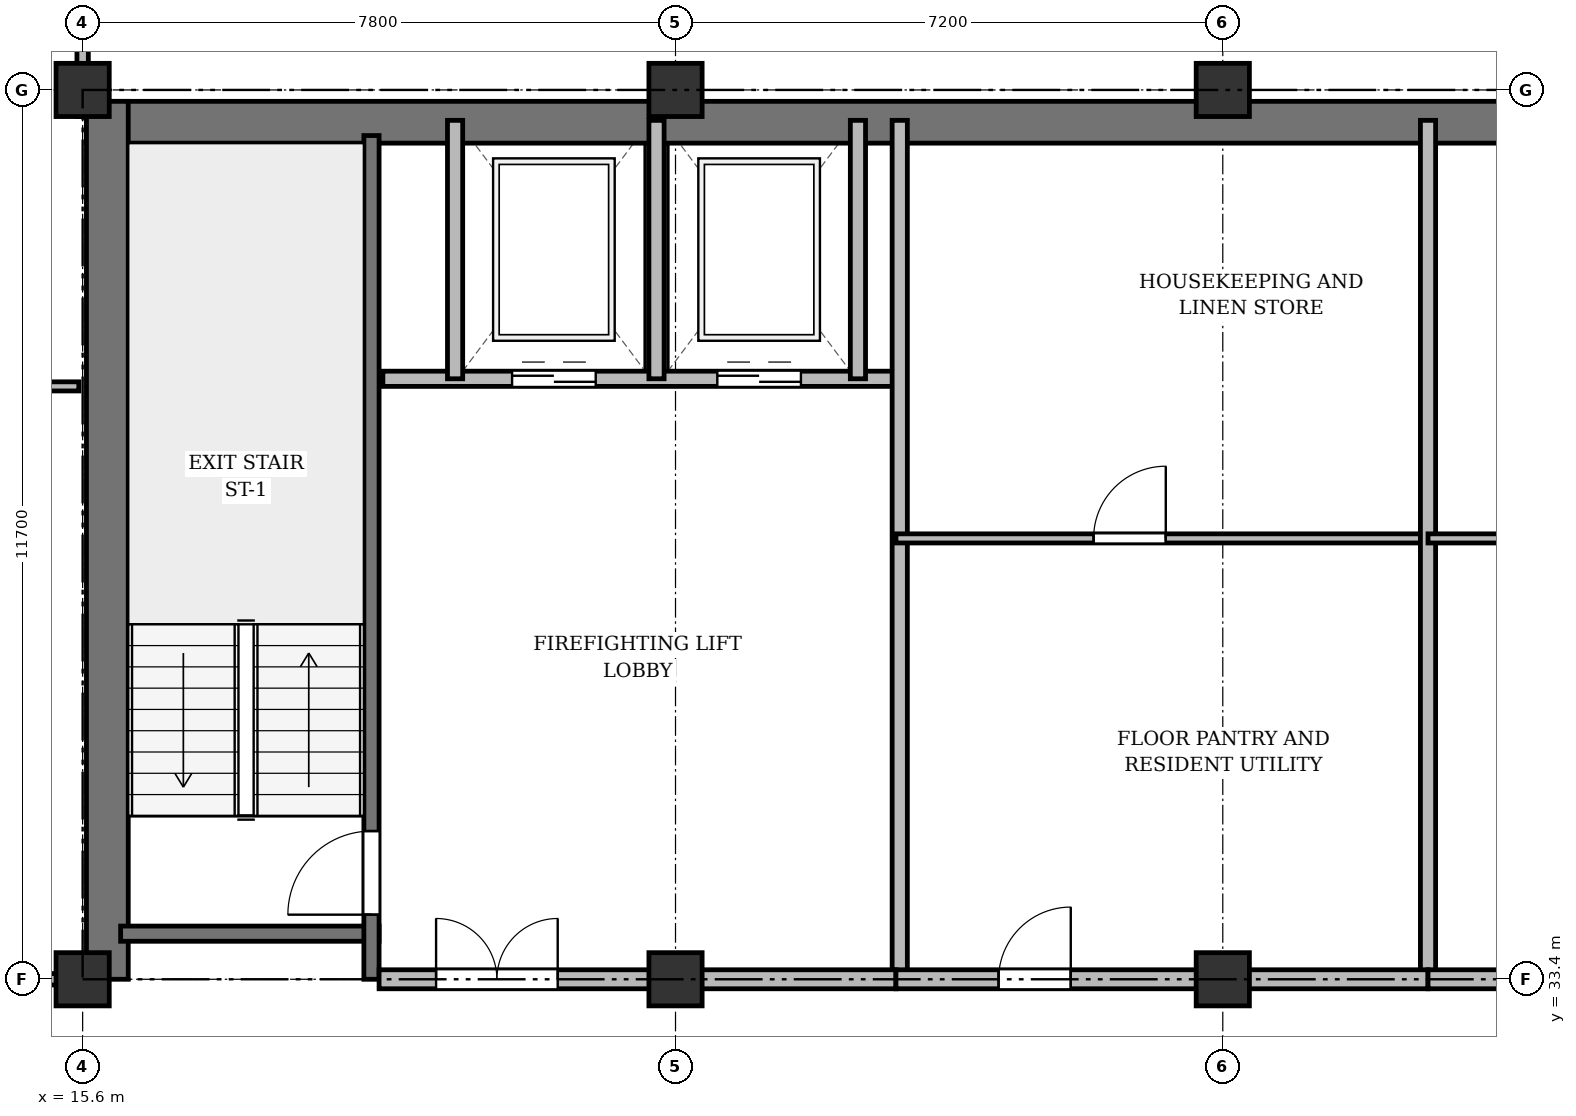
"""IFC4 building model, lengths in metres.
Left out: names, types, materials, properties, quantities, classifications, styles, units other than length and angle.
Written with IfcOpenShell. Run it as: python <this file> out.ifc"""

import sys

from ifc_helpers import new_model, si_unit, direction, frame, frame_2d, origin, origin_2d, place, context, subcontext, project, spatial, rectangle, extrude, source, transform, mapped, element, fill, save


model = new_model("IFC4")
c1 = context("Model", 3, precision=1e-05, world=origin(), true_north=direction((0.0, 1.0)))
c2 = subcontext(c1, "Body", "Model", "MODEL_VIEW")
j1 = project(units=[si_unit("LENGTHUNIT", "METRE"), si_unit("PLANEANGLEUNIT", "RADIAN")], contexts=[c1])
p1 = place(None, origin())
s1 = spatial("IfcSite", under=j1, at=p1, CompositionType="ELEMENT")
p2 = place(p1, origin())
s2 = spatial("IfcBuilding", under=s1, at=p2, CompositionType="ELEMENT")
p3 = place(p2, frame((0.0, 0.0, 233.7)))
s3 = spatial("IfcBuildingStorey", under=s2, at=p3, CompositionType="ELEMENT", Elevation=233.7)
m1 = source(origin(), c2, "Body", "SweptSolid", [
    extrude(rectangle(XDim=0.7, YDim=0.7, at=origin_2d()), origin(), (0.0, 0.0, 1.0), 3.6),
])
for number, where, z_axis, x_axis in (
    (1, (15.6, 33.4, 0.0), (0.0, 0.0, 1.0), (1.0, 0.0, 0.0)),
    (2, (15.6, 45.1, 0.0), (0.0, 0.0, 1.0), (1.0, 0.0, 0.0)),
    (3, (23.4, 33.4, 0.0), (0.0, 0.0, 1.0), (1.0, 0.0, 0.0)),
    (4, (23.4, 45.1, 0.0), (0.0, 0.0, 1.0), (1.0, 0.0, 0.0)),
    (5, (30.6, 33.4, 0.0), (0.0, 0.0, 1.0), (1.0, 0.0, 0.0)),
    (6, (30.6, 45.1, 0.0), (0.0, 0.0, 1.0), (1.0, 0.0, 0.0)),
):
    element("IfcColumn", number, at=place(p3, frame(where, z_axis=z_axis, x_axis=x_axis)), inside=s3, PredefinedType="COLUMN", context=c2, shape_type="MappedRepresentation", body=[
        mapped(m1, transform((0.0, 0.0, 0.0), x_axis=(1.0, 0.0, 0.0), y_axis=(0.0, 1.0, 0.0), z_axis=(0.0, 0.0, 1.0), scale=1.0)),
    ])
p4 = place(p3, frame((15.65, 44.675, 0.0), z_axis=(0.0, 0.0, 1.0), x_axis=(1.0, 0.0, 0.0)))
e7 = element("IfcWall", 7, at=p4, inside=s3, PredefinedType="SHEAR", context=c2, shape_type="SweptSolid", body=[
    extrude(rectangle(XDim=43.1, YDim=0.55, at=frame_2d((21.55, 0.0))), origin(), (0.0, 0.0, 1.0), 3.36),
])
p5 = place(p3, frame((15.925, 33.4, 0.0), z_axis=(0.0, 0.0, 1.0), x_axis=(0.0, 1.0, 0.0)))
e8 = element("IfcWall", 8, at=p5, inside=s3, PredefinedType="SHEAR", context=c2, shape_type="SweptSolid", body=[
    extrude(rectangle(XDim=11.55, YDim=0.55, at=frame_2d((5.775, 0.0))), origin(), (0.0, 0.0, 1.0), 3.36),
])
p6 = place(p3, frame((16.1, 34.0, 0.0), z_axis=(0.0, 0.0, 1.0), x_axis=(1.0, 0.0, 0.0)))
e9 = element("IfcWall", 9, at=p6, inside=s3, PredefinedType="SHEAR", context=c2, shape_type="SweptSolid", body=[
    extrude(rectangle(XDim=3.4, YDim=0.2, at=frame_2d((1.7, 0.0))), origin(), (0.0, 0.0, 1.0), 3.36),
])
p7 = place(p3, frame((19.4, 33.4, 0.0), z_axis=(0.0, 0.0, 1.0), x_axis=(0.0, 1.0, 0.0)))
e10 = element("IfcWall", 10, at=p7, inside=s3, PredefinedType="SHEAR", context=c2, shape_type="SweptSolid", body=[
    extrude(rectangle(XDim=11.1, YDim=0.2, at=frame_2d((5.55, 0.0))), origin(), (0.0, 0.0, 1.0), 3.36),
])
p8 = place(p7, frame((0.85, 0.0, 0.0)))
e11 = element("IfcOpeningElement", 11, at=p8, cuts=e10, PredefinedType="OPENING", context=c2, shape_type="SweptSolid", body=[
    extrude(rectangle(XDim=1.1, YDim=2.15, at=frame_2d((0.55, 1.075))), frame((0.0, 0.11, 0.0), z_axis=(0.0, -1.0, 0.0), x_axis=(1.0, 0.0, 0.0)), (0.0, 0.0, 1.0), 0.22),
])
p9 = place(p3, frame((19.55, 41.3, 0.0), z_axis=(0.0, 0.0, 1.0), x_axis=(1.0, 0.0, 0.0)))
e12 = element("IfcWall", 12, at=p9, inside=s3, PredefinedType="SOLIDWALL", context=c2, shape_type="SweptSolid", body=[
    extrude(rectangle(XDim=6.75, YDim=0.2, at=frame_2d((3.375, 0.0))), origin(), (0.0, 0.0, 1.0), 3.36),
])
p10 = place(p9, frame((1.7, 0.0, 0.0)))
e13 = element("IfcOpeningElement", 13, at=p10, cuts=e12, PredefinedType="OPENING", context=c2, shape_type="SweptSolid", body=[
    extrude(rectangle(XDim=1.1, YDim=2.15, at=frame_2d((0.55, 1.075))), frame((0.0, 0.11, 0.0), z_axis=(0.0, -1.0, 0.0), x_axis=(1.0, 0.0, 0.0)), (0.0, 0.0, 1.0), 0.22),
])
p11 = place(p9, frame((4.4, 0.0, 0.0)))
e14 = element("IfcOpeningElement", 14, at=p11, cuts=e12, PredefinedType="OPENING", context=c2, shape_type="SweptSolid", body=[
    extrude(rectangle(XDim=1.1, YDim=2.15, at=frame_2d((0.55, 1.075))), frame((0.0, 0.11, 0.0), z_axis=(0.0, -1.0, 0.0), x_axis=(1.0, 0.0, 0.0)), (0.0, 0.0, 1.0), 0.22),
])
for number, where, z_axis, x_axis in (
    (15, (20.5, 41.3, 0.0), (0.0, 0.0, 1.0), (0.0, 1.0, 0.0)),
    (16, (23.15, 41.3, 0.0), (0.0, 0.0, 1.0), (0.0, 1.0, 0.0)),
    (17, (25.8, 41.3, 0.0), (0.0, 0.0, 1.0), (0.0, 1.0, 0.0)),
):
    element("IfcWall", number, at=place(p3, frame(where, z_axis=z_axis, x_axis=x_axis)), inside=s3, PredefinedType="SOLIDWALL", context=c2, shape_type="SweptSolid", body=[
        extrude(rectangle(XDim=3.4, YDim=0.2, at=frame_2d((1.7, 0.0))), origin(), (0.0, 0.0, 1.0), 3.36),
    ])
p12 = place(p3, frame((26.35, 33.4, 0.0), z_axis=(0.0, 0.0, 1.0), x_axis=(0.0, 1.0, 0.0)))
e18 = element("IfcWall", 18, at=p12, inside=s3, PredefinedType="SOLIDWALL", context=c2, shape_type="SweptSolid", body=[
    extrude(rectangle(XDim=11.3, YDim=0.2, at=frame_2d((5.65, 0.0))), origin(), (0.0, 0.0, 1.0), 2.91),
])
p13 = place(p3, frame((19.5, 33.4, 0.0), z_axis=(0.0, 0.0, 1.0), x_axis=(1.0, 0.0, 0.0)))
e19 = element("IfcWall", 19, at=p13, inside=s3, PredefinedType="PARTITIONING", context=c2, shape_type="SweptSolid", body=[
    extrude(rectangle(XDim=6.8, YDim=0.25, at=frame_2d((3.4, 0.0))), origin(), (0.0, 0.0, 1.0), 2.91),
])
p14 = place(p13, frame((0.75, 0.0, 0.0)))
e20 = element("IfcOpeningElement", 20, at=p14, cuts=e19, PredefinedType="OPENING", context=c2, shape_type="SweptSolid", body=[
    extrude(rectangle(XDim=1.6, YDim=2.2, at=frame_2d((0.8, 1.1))), frame((0.0, 0.135, 0.0), z_axis=(0.0, -1.0, 0.0), x_axis=(1.0, 0.0, 0.0)), (0.0, 0.0, 1.0), 0.27),
])
p15 = place(p3, frame((26.3, 39.2, 0.0), z_axis=(0.0, 0.0, 1.0), x_axis=(1.0, 0.0, 0.0)))
e21 = element("IfcWall", 21, at=p15, inside=s3, PredefinedType="PARTITIONING", context=c2, shape_type="SweptSolid", body=[
    extrude(rectangle(XDim=7.0, YDim=0.12, at=frame_2d((3.5, 0.0))), origin(), (0.0, 0.0, 1.0), 2.86),
])
p16 = place(p15, frame((2.6, 0.0, 0.0)))
e22 = element("IfcOpeningElement", 22, at=p16, cuts=e21, PredefinedType="OPENING", context=c2, shape_type="SweptSolid", body=[
    extrude(rectangle(XDim=0.95, YDim=2.15, at=frame_2d((0.475, 1.075))), frame((0.0, 0.07, 0.0), z_axis=(0.0, -1.0, 0.0), x_axis=(1.0, 0.0, 0.0)), (0.0, 0.0, 1.0), 0.14),
])
p17 = place(p3, frame((33.3, 33.4, 0.0), z_axis=(0.0, 0.0, 1.0), x_axis=(0.0, 1.0, 0.0)))
e23 = element("IfcWall", 23, at=p17, inside=s3, PredefinedType="SOLIDWALL", context=c2, shape_type="SweptSolid", body=[
    extrude(rectangle(XDim=11.3, YDim=0.2, at=frame_2d((5.65, 0.0))), origin(), (0.0, 0.0, 1.0), 2.91),
])
p18 = place(p3, frame((33.3, 39.2, 0.0), z_axis=(0.0, 0.0, 1.0), x_axis=(1.0, 0.0, 0.0)))
e24 = element("IfcWall", 24, at=p18, inside=s3, PredefinedType="PARTITIONING", context=c2, shape_type="SweptSolid", body=[
    extrude(rectangle(XDim=6.8, YDim=0.12, at=frame_2d((3.4, 0.0))), origin(), (0.0, 0.0, 1.0), 3.36),
])
p19 = place(p18, frame((2.6, 0.0, 0.0)))
e25 = element("IfcOpeningElement", 25, at=p19, cuts=e24, PredefinedType="OPENING", context=c2, shape_type="SweptSolid", body=[
    extrude(rectangle(XDim=0.95, YDim=2.15, at=frame_2d((0.475, 1.075))), frame((0.0, 0.07, 0.0), z_axis=(0.0, -1.0, 0.0), x_axis=(1.0, 0.0, 0.0)), (0.0, 0.0, 1.0), 0.14),
])
p20 = place(p3, frame((26.3, 33.4, 0.0), z_axis=(0.0, 0.0, 1.0), x_axis=(1.0, 0.0, 0.0)))
e26 = element("IfcWall", 26, at=p20, inside=s3, PredefinedType="PARTITIONING", context=c2, shape_type="SweptSolid", body=[
    extrude(rectangle(XDim=7.0, YDim=0.25, at=frame_2d((3.5, 0.0))), origin(), (0.0, 0.0, 1.0), 2.91),
])
p21 = place(p20, frame((1.35, 0.0, 0.0)))
e27 = element("IfcOpeningElement", 27, at=p21, cuts=e26, PredefinedType="OPENING", context=c2, shape_type="SweptSolid", body=[
    extrude(rectangle(XDim=0.95, YDim=2.15, at=frame_2d((0.475, 1.075))), frame((0.0, 0.135, 0.0), z_axis=(0.0, -1.0, 0.0), x_axis=(1.0, 0.0, 0.0)), (0.0, 0.0, 1.0), 0.27),
])
p22 = place(p3, frame((33.3, 33.4, 0.0), z_axis=(0.0, 0.0, 1.0), x_axis=(1.0, 0.0, 0.0)))
e28 = element("IfcWall", 28, at=p22, inside=s3, PredefinedType="PARTITIONING", context=c2, shape_type="SweptSolid", body=[
    extrude(rectangle(XDim=6.8, YDim=0.25, at=frame_2d((3.4, 0.0))), origin(), (0.0, 0.0, 1.0), 2.91),
])
p23 = place(p22, frame((2.4, 0.0, 0.0)))
e29 = element("IfcOpeningElement", 29, at=p23, cuts=e28, PredefinedType="OPENING", context=c2, shape_type="SweptSolid", body=[
    extrude(rectangle(XDim=1.0, YDim=2.15, at=frame_2d((0.5, 1.075))), frame((0.0, 0.135, 0.0), z_axis=(0.0, -1.0, 0.0), x_axis=(1.0, 0.0, 0.0)), (0.0, 0.0, 1.0), 0.27),
])
p24 = place(p3, frame((8.3, 41.2, 0.0), z_axis=(0.0, 0.0, 1.0), x_axis=(1.0, 0.0, 0.0)))
e30 = element("IfcWall", 30, at=p24, inside=s3, PredefinedType="PARTITIONING", context=c2, shape_type="SweptSolid", body=[
    extrude(rectangle(XDim=7.25, YDim=0.12, at=frame_2d((3.625, 0.0))), origin(), (0.0, 0.0, 1.0), 2.86),
])
p25 = place(p24, frame((3.15, 0.0, 0.0)))
e31 = element("IfcOpeningElement", 31, at=p25, cuts=e30, PredefinedType="OPENING", context=c2, shape_type="SweptSolid", body=[
    extrude(rectangle(XDim=0.95, YDim=2.15, at=frame_2d((0.475, 1.075))), frame((0.0, 0.07, 0.0), z_axis=(0.0, -1.0, 0.0), x_axis=(1.0, 0.0, 0.0)), (0.0, 0.0, 1.0), 0.14),
])
p26 = place(p3, frame((8.25, 33.4, 0.0), z_axis=(0.0, 0.0, 1.0), x_axis=(1.0, 0.0, 0.0)))
e32 = element("IfcWall", 32, at=p26, inside=s3, PredefinedType="PARTITIONING", context=c2, shape_type="SweptSolid", body=[
    extrude(rectangle(XDim=7.35, YDim=0.15, at=frame_2d((3.675, 0.0))), origin(), (0.0, 0.0, 1.0), 2.91),
])
p27 = place(p26, frame((3.192, 0.0, 0.0)))
e33 = element("IfcOpeningElement", 33, at=p27, cuts=e32, PredefinedType="OPENING", context=c2, shape_type="SweptSolid", body=[
    extrude(rectangle(XDim=0.95, YDim=2.15, at=frame_2d((0.475, 1.075))), frame((0.0, 0.085, 0.0), z_axis=(0.0, -1.0, 0.0), x_axis=(1.0, 0.0, 0.0)), (0.0, 0.0, 1.0), 0.17),
])
p28 = place(p3, frame((15.6, 44.75, 0.0), z_axis=(0.0, 0.0, 1.0), x_axis=(0.0, 1.0, 0.0)))
e34 = element("IfcWall", 34, at=p28, inside=s3, PredefinedType="PARTITIONING", context=c2, shape_type="SweptSolid", body=[
    extrude(rectangle(XDim=3.61, YDim=0.15, at=frame_2d((1.805, 0.0))), origin(), (0.0, 0.0, 1.0), 2.86),
])
p29 = place(p28, frame((1.1, 0.0, 0.0)))
e35 = element("IfcOpeningElement", 35, at=p29, cuts=e34, PredefinedType="OPENING", context=c2, shape_type="SweptSolid", body=[
    extrude(rectangle(XDim=0.95, YDim=2.15, at=frame_2d((0.475, 1.075))), frame((0.0, 0.085, 0.0), z_axis=(0.0, -1.0, 0.0), x_axis=(1.0, 0.0, 0.0)), (0.0, 0.0, 1.0), 0.17),
])
m2 = source(origin(), c2, "Body", "SweptSolid", [
    extrude(rectangle(XDim=1.1, YDim=2.15, at=frame_2d((0.55, 1.075))), frame((0.0, 0.025, 0.0), z_axis=(0.0, -1.0, 0.0), x_axis=(1.0, 0.0, 0.0)), (0.0, 0.0, 1.0), 0.05),
])
p30 = place(p8, origin())
e36 = element("IfcDoor", 36, at=p30, inside=s3, OperationType="SINGLE_SWING_LEFT", PredefinedType="DOOR", context=c2, shape_type="MappedRepresentation", body=[
    mapped(m2, transform((0.0, 0.0, 0.0), x_axis=(1.0, 0.0, 0.0), y_axis=(0.0, 1.0, 0.0), z_axis=(0.0, 0.0, 1.0), scale=1.0)),
])
fill(e11, e36)
p31 = place(p10, origin())
e37 = element("IfcDoor", 37, at=p31, inside=s3, OperationType="DOUBLE_DOOR_SLIDING", PredefinedType="DOOR", context=c2, shape_type="MappedRepresentation", body=[
    mapped(m2, transform((0.0, 0.0, 0.0), x_axis=(1.0, 0.0, 0.0), y_axis=(0.0, 1.0, 0.0), z_axis=(0.0, 0.0, 1.0), scale=1.0)),
])
fill(e13, e37)
p32 = place(p11, origin())
e38 = element("IfcDoor", 38, at=p32, inside=s3, OperationType="DOUBLE_DOOR_SLIDING", PredefinedType="DOOR", context=c2, shape_type="MappedRepresentation", body=[
    mapped(m2, transform((0.0, 0.0, 0.0), x_axis=(1.0, 0.0, 0.0), y_axis=(0.0, 1.0, 0.0), z_axis=(0.0, 0.0, 1.0), scale=1.0)),
])
fill(e14, e38)
m3 = source(origin(), c2, "Body", "SweptSolid", [
    extrude(rectangle(XDim=1.6, YDim=2.2, at=frame_2d((0.8, 1.1))), frame((0.0, 0.025, 0.0), z_axis=(0.0, -1.0, 0.0), x_axis=(1.0, 0.0, 0.0)), (0.0, 0.0, 1.0), 0.05),
])
p33 = place(p14, origin())
e39 = element("IfcDoor", 39, at=p33, inside=s3, OperationType="DOUBLE_DOOR_SINGLE_SWING", PredefinedType="DOOR", context=c2, shape_type="MappedRepresentation", body=[
    mapped(m3, transform((0.0, 0.0, 0.0), x_axis=(1.0, 0.0, 0.0), y_axis=(0.0, 1.0, 0.0), z_axis=(0.0, 0.0, 1.0), scale=1.0)),
])
fill(e20, e39)
m4 = source(origin(), c2, "Body", "SweptSolid", [
    extrude(rectangle(XDim=0.95, YDim=2.15, at=frame_2d((0.475, 1.075))), frame((0.0, 0.025, 0.0), z_axis=(0.0, -1.0, 0.0), x_axis=(1.0, 0.0, 0.0)), (0.0, 0.0, 1.0), 0.05),
])
p34 = place(p16, origin())
e40 = element("IfcDoor", 40, at=p34, inside=s3, OperationType="SINGLE_SWING_RIGHT", PredefinedType="DOOR", context=c2, shape_type="MappedRepresentation", body=[
    mapped(m4, transform((0.0, 0.0, 0.0), x_axis=(1.0, 0.0, 0.0), y_axis=(0.0, 1.0, 0.0), z_axis=(0.0, 0.0, 1.0), scale=1.0)),
])
fill(e22, e40)
p35 = place(p21, origin())
e41 = element("IfcDoor", 41, at=p35, inside=s3, OperationType="SINGLE_SWING_RIGHT", PredefinedType="DOOR", context=c2, shape_type="MappedRepresentation", body=[
    mapped(m4, transform((0.0, 0.0, 0.0), x_axis=(1.0, 0.0, 0.0), y_axis=(0.0, 1.0, 0.0), z_axis=(0.0, 0.0, 1.0), scale=1.0)),
])
fill(e27, e41)
save(model, sys.argv[1])
